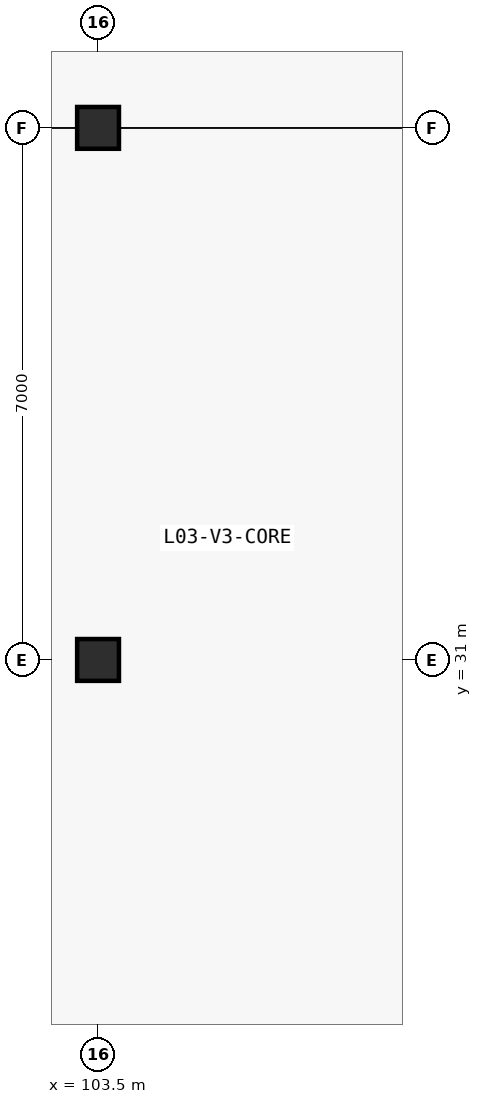
"""IFC4 building model, lengths in metres.
Left out: names, types, materials, properties, quantities, classifications, styles, units other than length and angle.
Written with IfcOpenShell. Run it as: python <this file> out.ifc"""

import sys

from ifc_helpers import new_model, si_unit, direction, frame, origin, origin_2d, place, context, subcontext, project, spatial, rectangle, extrude, element, save


model = new_model("IFC4")
c1 = context("Model", 3, precision=1e-05, world=origin(), true_north=direction((0.0, 1.0)))
c2 = subcontext(c1, "Body", "Model", "MODEL_VIEW")
j1 = project(units=[si_unit("LENGTHUNIT", "METRE"), si_unit("PLANEANGLEUNIT", "RADIAN")], contexts=[c1])
p1 = place(None, origin())
s1 = spatial("IfcSite", under=j1, at=p1, CompositionType="ELEMENT")
p2 = place(p1, origin())
s2 = spatial("IfcBuilding", under=s1, at=p2, CompositionType="ELEMENT")
p3 = place(p2, frame((0.0, 0.0, 12.6)))
s3 = spatial("IfcBuildingStorey", under=s2, at=p3, CompositionType="ELEMENT", Elevation=12.6)
for number, where, z_axis, x_axis in (
    (1, (103.5, 31.0, 0.0), (0.0, 0.0, 1.0), (1.0, 0.0, 0.0)),
    (2, (103.5, 38.0, 0.0), (0.0, 0.0, 1.0), (1.0, 0.0, 0.0)),
):
    element("IfcColumn", number, at=place(p3, frame(where, z_axis=z_axis, x_axis=x_axis)), inside=s3, PredefinedType="COLUMN", context=c2, shape_type="SweptSolid", body=[
        extrude(rectangle(XDim=0.55, YDim=0.55, at=origin_2d()), origin(), (0.0, 0.0, 1.0), 4.2),
    ])
save(model, sys.argv[1])
